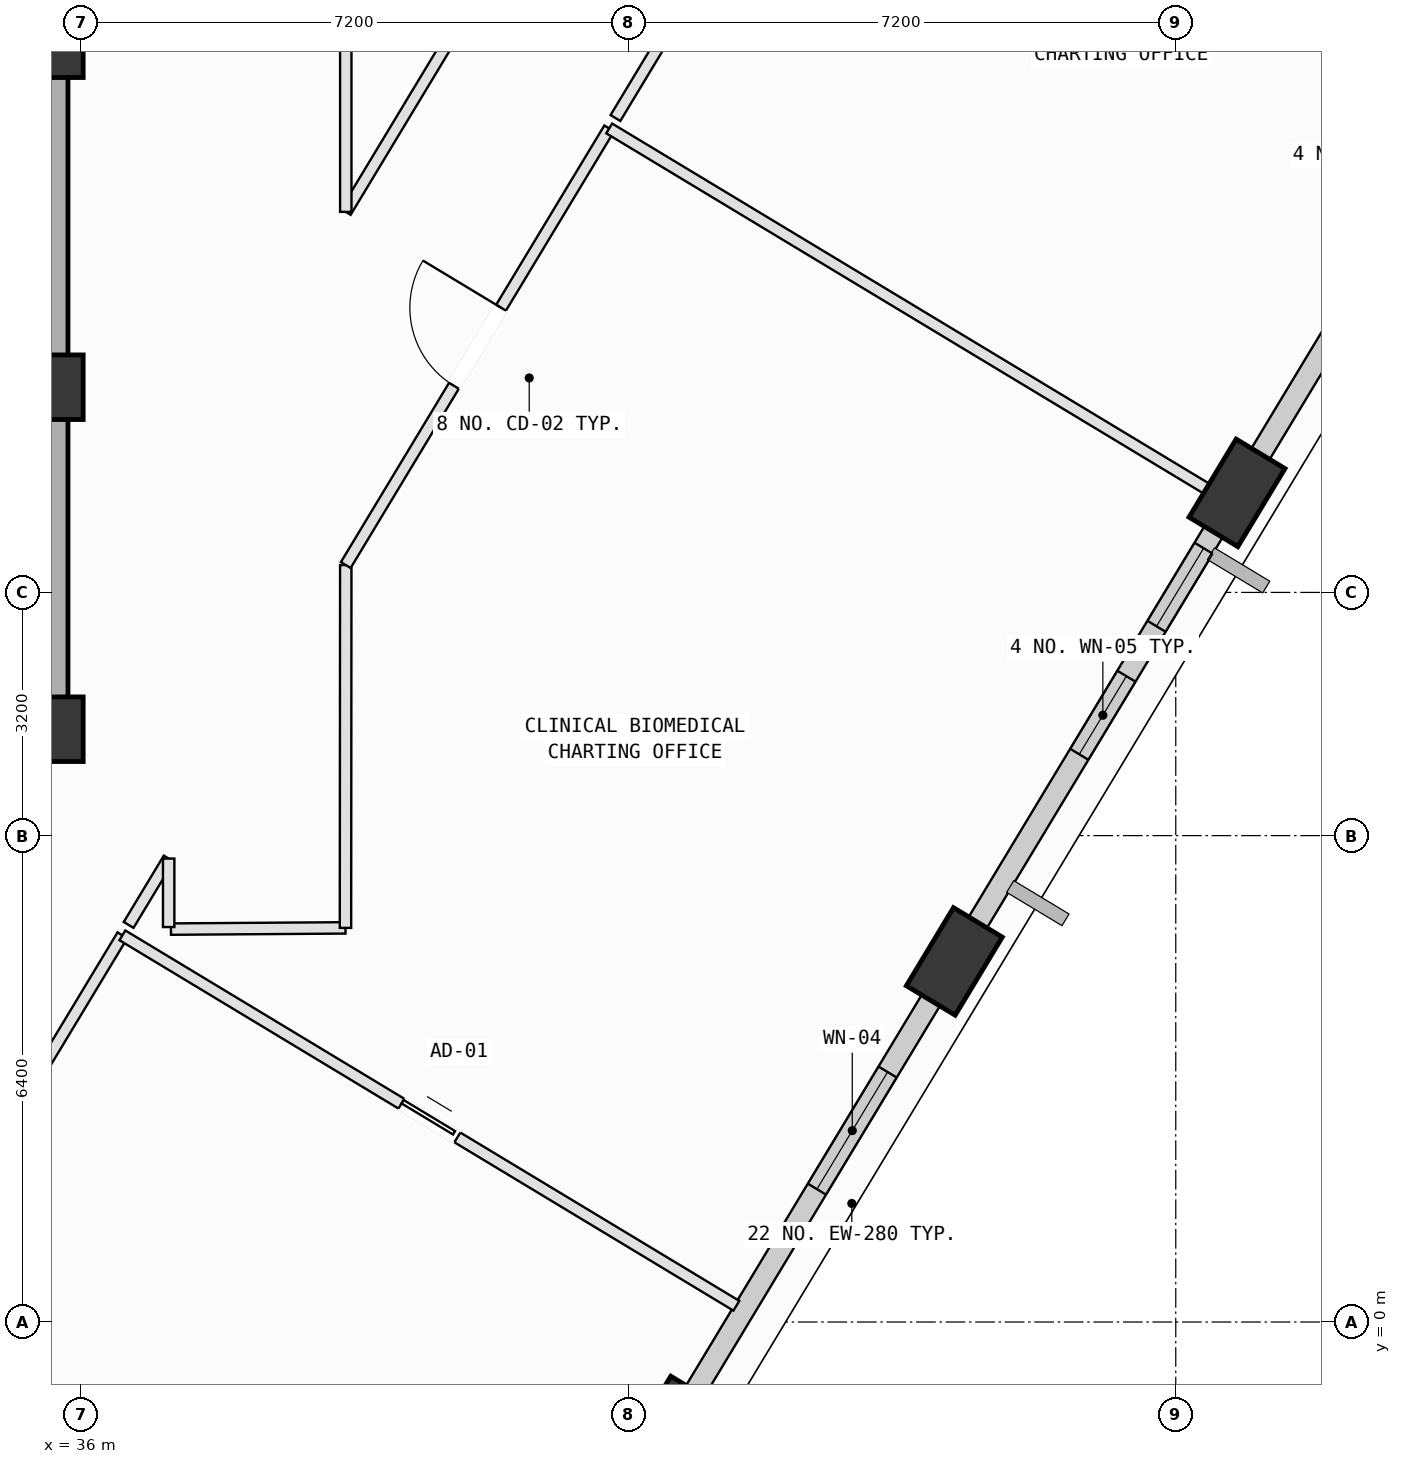
"""IFC4 building model, lengths in metres.
Left out: names, types, materials, properties, quantities, classifications, styles, units other than length and angle.
Written with IfcOpenShell. Run it as: python <this file> out.ifc"""

import sys

from ifc_helpers import new_model, si_unit, direction, frame, frame_2d, origin, origin_2d, place, context, subcontext, project, spatial, rectangle, extrude, element, fill, save


model = new_model("IFC4")
c1 = context("Model", 3, precision=1e-05, world=origin(), true_north=direction((0.0, 1.0)))
c2 = subcontext(c1, "Body", "Model", "MODEL_VIEW")
j1 = project(units=[si_unit("LENGTHUNIT", "METRE"), si_unit("PLANEANGLEUNIT", "RADIAN")], contexts=[c1])
p1 = place(None, origin())
s1 = spatial("IfcSite", under=j1, at=p1, CompositionType="ELEMENT")
p2 = place(p1, origin())
s2 = spatial("IfcBuilding", under=s1, at=p2, CompositionType="ELEMENT")
p3 = place(p2, frame((0.0, 0.0, 276.6)))
s3 = spatial("IfcBuildingStorey", under=s2, at=p3, CompositionType="ELEMENT", Elevation=276.6)
for number, where, z_axis, x_axis in (
    (1, (35.6, 7.8, 0.0), (0.0, 0.0, 1.0), (1.0, 0.0, 0.0)),
    (2, (35.6, 12.3, 0.0), (0.0, 0.0, 1.0), (1.0, 0.0, 0.0)),
    (3, (35.6, 16.8, 0.0), (0.0, 0.0, 1.0), (1.0, 0.0, 0.0)),
):
    element("IfcColumn", number, at=place(p3, frame(where, z_axis=z_axis, x_axis=x_axis)), inside=s3, PredefinedType="COLUMN", context=c2, shape_type="SweptSolid", body=[
        extrude(rectangle(XDim=0.85, YDim=0.85, at=origin_2d()), origin(), (0.0, 0.0, 1.0), 4.0),
    ])
p4 = place(p3, frame((43.768, -1.421, 0.002), z_axis=(0.107586077472, 0.042779573952, 0.993274958904), x_axis=(-0.981176466605, 0.165723838035, 0.099138039555)))
e4 = element("IfcColumn", 4, at=p4, inside=s3, PredefinedType="COLUMN", context=c2, shape_type="SweptSolid", body=[
    extrude(rectangle(XDim=1.2, YDim=0.75, at=origin_2d()), origin(), (0.0, 0.0, 1.0), 4.023),
])
p5 = place(p3, frame((47.487, 4.745, 0.002), z_axis=(0.082237012111, 0.057924517769, 0.9949280497), x_axis=(-0.993940655295, -0.068289052972, 0.086131173199)))
e5 = element("IfcColumn", 5, at=p5, inside=s3, PredefinedType="COLUMN", context=c2, shape_type="SweptSolid", body=[
    extrude(rectangle(XDim=1.2, YDim=0.75, at=origin_2d()), origin(), (0.0, 0.0, 1.0), 4.017),
])
p6 = place(p3, frame((51.206, 10.91, 0.002), z_axis=(0.056692424578, 0.073177024428, 0.995706328237), x_axis=(-0.930488175419, -0.357643802358, 0.079263270434)))
e6 = element("IfcColumn", 6, at=p6, inside=s3, PredefinedType="COLUMN", context=c2, shape_type="SweptSolid", body=[
    extrude(rectangle(XDim=1.2, YDim=0.75, at=origin_2d()), origin(), (0.0, 0.0, 1.0), 4.014),
])
p7 = place(p3, frame((47.381, 4.57, 0.0), z_axis=(0.0, 0.0, 1.0), x_axis=(-0.516524062201, -0.856272674542, 0.0)))
e7 = element("IfcWall", 7, at=p7, inside=s3, PredefinedType="SOLIDWALL", context=c2, shape_type="SweptSolid", body=[
    extrude(rectangle(XDim=6.438, YDim=0.28, at=frame_2d((3.219, 0.0))), origin(), (0.0, 0.0, 1.0), 3.265),
])
p8 = place(p7, frame((1.495, 0.0, 0.75)))
e8 = element("IfcOpeningElement", 8, at=p8, cuts=e7, PredefinedType="OPENING", context=c2, shape_type="SweptSolid", body=[
    extrude(rectangle(XDim=1.8, YDim=2.05, at=frame_2d((0.9, 1.025))), frame((0.0, 0.15, 0.0), z_axis=(0.0, -1.0, 0.0), x_axis=(1.0, 0.0, 0.0)), (0.0, 0.0, 1.0), 0.3),
])
p9 = place(p3, frame((51.096, 10.728, 0.0), z_axis=(0.0, 0.0, 1.0), x_axis=(-0.516526398174, -0.856271265423, 0.0)))
e9 = element("IfcWall", 9, at=p9, inside=s3, PredefinedType="SOLIDWALL", context=c2, shape_type="SweptSolid", body=[
    extrude(rectangle(XDim=6.414, YDim=0.28, at=frame_2d((3.207, 0.0))), origin(), (0.0, 0.0, 1.0), 3.265),
])
p10 = place(p9, frame((2.604, 0.0, 0.75)))
e10 = element("IfcOpeningElement", 10, at=p10, cuts=e9, PredefinedType="OPENING", context=c2, shape_type="SweptSolid", body=[
    extrude(rectangle(XDim=1.2, YDim=1.75, at=frame_2d((0.6, 0.875))), frame((0.0, 0.15, 0.0), z_axis=(0.0, -1.0, 0.0), x_axis=(1.0, 0.0, 0.0)), (0.0, 0.0, 1.0), 0.3),
])
p11 = place(p9, frame((0.637, 0.0, 0.75)))
e11 = element("IfcOpeningElement", 11, at=p11, cuts=e9, PredefinedType="OPENING", context=c2, shape_type="SweptSolid", body=[
    extrude(rectangle(XDim=1.2, YDim=1.75, at=frame_2d((0.6, 0.875))), frame((0.0, 0.15, 0.0), z_axis=(0.0, -1.0, 0.0), x_axis=(1.0, 0.0, 0.0)), (0.0, 0.0, 1.0), 0.3),
])
p12 = place(p3, frame((54.815, 16.894, 0.0), z_axis=(0.0, 0.0, 1.0), x_axis=(-0.516539738379, -0.856263218102, 0.0)))
e12 = element("IfcWall", 12, at=p12, inside=s3, PredefinedType="SOLIDWALL", context=c2, shape_type="SweptSolid", body=[
    extrude(rectangle(XDim=6.407, YDim=0.28, at=frame_2d((3.203, 0.0))), origin(), (0.0, 0.0, 1.0), 3.265),
])
p13 = place(p12, frame((2.404, 0.0, 0.75)))
e13 = element("IfcOpeningElement", 13, at=p13, cuts=e12, PredefinedType="OPENING", context=c2, shape_type="SweptSolid", body=[
    extrude(rectangle(XDim=1.6, YDim=1.95, at=frame_2d((0.8, 0.975))), frame((0.0, 0.15, 0.0), z_axis=(0.0, -1.0, 0.0), x_axis=(1.0, 0.0, 0.0)), (0.0, 0.0, 1.0), 0.3),
])
p14 = place(p3, frame((35.6, 7.8, 0.0), z_axis=(0.0, 0.0, 1.0), x_axis=(0.0, 1.0, 0.0)))
e14 = element("IfcWall", 14, at=p14, inside=s3, PredefinedType="SHEAR", context=c2, shape_type="SweptSolid", body=[
    extrude(rectangle(XDim=9.0, YDim=0.45, at=frame_2d((4.5, 0.0))), origin(), (0.0, 0.0, 1.0), 3.78),
])
p15 = place(p3, frame((30.355, -5.166, 0.0), z_axis=(0.0, 0.0, 1.0), x_axis=(0.516562927605, 0.856249228802, 0.0)))
e15 = element("IfcWall", 15, at=p15, inside=s3, PredefinedType="PARTITIONING", context=c2, shape_type="SweptSolid", body=[
    extrude(rectangle(XDim=11.975, YDim=0.15, at=frame_2d((5.988, 0.0))), origin(), (0.0, 0.0, 1.0), 3.78),
])
p16 = place(p3, frame((36.541, 5.088, 0.0), z_axis=(0.0, 0.0, 1.0), x_axis=(0.856225356417, -0.516602496151, 0.0)))
e16 = element("IfcWall", 16, at=p16, inside=s3, PredefinedType="PARTITIONING", context=c2, shape_type="SweptSolid", body=[
    extrude(rectangle(XDim=9.434, YDim=0.15, at=frame_2d((4.717, 0.0))), origin(), (0.0, 0.0, 1.0), 3.78),
])
p17 = place(p16, frame((4.287, 0.0, 0.0)))
e17 = element("IfcOpeningElement", 17, at=p17, cuts=e16, PredefinedType="OPENING", context=c2, shape_type="SweptSolid", body=[
    extrude(rectangle(XDim=0.86, YDim=2.06, at=frame_2d((0.43, 1.03))), frame((0.0, 0.085, 0.0), z_axis=(0.0, -1.0, 0.0), x_axis=(1.0, 0.0, 0.0)), (0.0, 0.0, 1.0), 0.17),
])
p18 = place(p3, frame((37.18, 5.17, 0.0), z_axis=(0.0, 0.0, 1.0), x_axis=(0.999975377948, 0.007017371073, 0.0)))
e18 = element("IfcWall", 18, at=p18, inside=s3, PredefinedType="PARTITIONING", context=c2, shape_type="SweptSolid", body=[
    extrude(rectangle(XDim=2.296, YDim=0.15, at=frame_2d((1.148, 0.0))), origin(), (0.0, 0.0, 1.0), 3.78),
])
p19 = place(p3, frame((39.476, 5.186, 0.0), z_axis=(0.0, 0.0, 1.0), x_axis=(0.000818246632, 0.999999665236, 0.0)))
e19 = element("IfcWall", 19, at=p19, inside=s3, PredefinedType="PARTITIONING", context=c2, shape_type="SweptSolid", body=[
    extrude(rectangle(XDim=4.774, YDim=0.15, at=frame_2d((2.387, 0.0))), origin(), (0.0, 0.0, 1.0), 3.78),
])
p20 = place(p3, frame((39.48, 9.96, 0.0), z_axis=(0.0, 0.0, 1.0), x_axis=(0.516575747775, 0.856241494446, 0.0)))
e20 = element("IfcWall", 20, at=p20, inside=s3, PredefinedType="PARTITIONING", context=c2, shape_type="SweptSolid", body=[
    extrude(rectangle(XDim=6.71, YDim=0.15, at=frame_2d((3.355, 0.0))), origin(), (0.0, 0.0, 1.0), 3.78),
])
p21 = place(p20, frame((2.755, 0.0, 0.0)))
e21 = element("IfcOpeningElement", 21, at=p21, cuts=e20, PredefinedType="OPENING", context=c2, shape_type="SweptSolid", body=[
    extrude(rectangle(XDim=1.2, YDim=2.15, at=frame_2d((0.6, 1.075))), frame((0.0, 0.085, 0.0), z_axis=(0.0, -1.0, 0.0), x_axis=(1.0, 0.0, 0.0)), (0.0, 0.0, 1.0), 0.17),
])
p22 = place(p3, frame((42.946, 15.705, 0.0), z_axis=(0.0, 0.0, 1.0), x_axis=(0.85631180797, -0.516459182831, 0.0)))
e22 = element("IfcWall", 22, at=p22, inside=s3, PredefinedType="PARTITIONING", context=c2, shape_type="SweptSolid", body=[
    extrude(rectangle(XDim=9.447, YDim=0.15, at=frame_2d((4.724, 0.0))), origin(), (0.0, 0.0, 1.0), 3.78),
])
p23 = place(p3, frame((47.98, 5.117, 0.0), z_axis=(0.0, 0.0, 1.0), x_axis=(-0.516847403062, -0.856077544355, 0.0)))
e23 = element("IfcWall", 23, at=p23, inside=s3, PredefinedType="PARTITIONING", context=c2, shape_type="SweptSolid", body=[
    extrude(rectangle(XDim=0.778, YDim=0.15, at=frame_2d((0.389, 0.0))), origin(), (0.0, 0.0, 1.0), 3.265),
])
p24 = place(p3, frame((36.623, 5.225, 0.0), z_axis=(0.0, 0.0, 1.0), x_axis=(0.516783003551, 0.856116421546, 0.0)))
e24 = element("IfcWall", 24, at=p24, inside=s3, PredefinedType="PARTITIONING", context=c2, shape_type="SweptSolid", body=[
    extrude(rectangle(XDim=1.02, YDim=0.15, at=frame_2d((0.51, 0.0))), origin(), (0.0, 0.0, 1.0), 3.78),
])
p25 = place(p3, frame((37.15, 6.098, 0.0), z_axis=(0.0, 0.0, 1.0), x_axis=(0.0, -1.0, 0.0)))
e25 = element("IfcWall", 25, at=p25, inside=s3, PredefinedType="PARTITIONING", context=c2, shape_type="SweptSolid", body=[
    extrude(rectangle(XDim=0.901, YDim=0.15, at=frame_2d((0.45, 0.0))), origin(), (0.0, 0.0, 1.0), 3.78),
])
p26 = place(p3, frame((43.028, 15.842, 0.0), z_axis=(0.0, 0.0, 1.0), x_axis=(0.516562112888, 0.856249720309, 0.0)))
e26 = element("IfcWall", 26, at=p26, inside=s3, PredefinedType="PARTITIONING", context=c2, shape_type="SweptSolid", body=[
    extrude(rectangle(XDim=12.24, YDim=0.15, at=frame_2d((6.12, 0.0))), origin(), (0.0, 0.0, 1.0), 3.415),
])
p27 = place(p26, frame((5.52, 0.0, 0.0)))
e27 = element("IfcOpeningElement", 27, at=p27, cuts=e26, PredefinedType="OPENING", context=c2, shape_type="SweptSolid", body=[
    extrude(rectangle(XDim=1.2, YDim=2.15, at=frame_2d((0.6, 1.075))), frame((0.0, 0.085, 0.0), z_axis=(0.0, -1.0, 0.0), x_axis=(1.0, 0.0, 0.0)), (0.0, 0.0, 1.0), 0.17),
])
p28 = place(p3, frame((51.703, 11.289, 0.0), z_axis=(0.0, 0.0, 1.0), x_axis=(-0.515730444954, -0.856750902041, 0.0)))
e28 = element("IfcWall", 28, at=p28, inside=s3, PredefinedType="PARTITIONING", context=c2, shape_type="SweptSolid", body=[
    extrude(rectangle(XDim=0.581, YDim=0.15, at=frame_2d((0.291, 0.0))), origin(), (0.0, 0.0, 1.0), 3.265),
])
p29 = place(p3, frame((42.599, 19.777, 0.0), z_axis=(0.0, 0.0, 1.0), x_axis=(-0.516569402647, -0.856245322468, 0.0)))
e29 = element("IfcWall", 29, at=p29, inside=s3, PredefinedType="PARTITIONING", context=c2, shape_type="SweptSolid", body=[
    extrude(rectangle(XDim=6.038, YDim=0.15, at=frame_2d((3.019, 0.0))), origin(), (0.0, 0.0, 1.0), 3.78),
])
p30 = place(p3, frame((39.48, 14.607, 0.0), z_axis=(0.0, 0.0, 1.0), x_axis=(0.0, 1.0, 0.0)))
e30 = element("IfcWall", 30, at=p30, inside=s3, PredefinedType="PARTITIONING", context=c2, shape_type="SweptSolid", body=[
    extrude(rectangle(XDim=6.246, YDim=0.15, at=frame_2d((3.123, 0.0))), origin(), (0.0, 0.0, 1.0), 3.78),
])
p31 = place(p8, origin())
e31 = element("IfcWindow", 31, at=p31, inside=s3, PartitioningType="SINGLE_PANEL", PredefinedType="WINDOW", context=c2, shape_type="SweptSolid", body=[
    extrude(rectangle(XDim=1.8, YDim=2.05, at=frame_2d((0.9, 1.025))), frame((0.0, 0.03, 0.0), z_axis=(0.0, -1.0, 0.0), x_axis=(1.0, 0.0, 0.0)), (0.0, 0.0, 1.0), 0.06),
])
fill(e8, e31)
p32 = place(p10, origin())
e32 = element("IfcWindow", 32, at=p32, inside=s3, PartitioningType="SINGLE_PANEL", PredefinedType="WINDOW", context=c2, shape_type="SweptSolid", body=[
    extrude(rectangle(XDim=1.2, YDim=1.75, at=frame_2d((0.6, 0.875))), frame((0.0, 0.03, 0.0), z_axis=(0.0, -1.0, 0.0), x_axis=(1.0, 0.0, 0.0)), (0.0, 0.0, 1.0), 0.06),
])
fill(e10, e32)
p33 = place(p11, origin())
e33 = element("IfcWindow", 33, at=p33, inside=s3, PartitioningType="SINGLE_PANEL", PredefinedType="WINDOW", context=c2, shape_type="SweptSolid", body=[
    extrude(rectangle(XDim=1.2, YDim=1.75, at=frame_2d((0.6, 0.875))), frame((0.0, 0.03, 0.0), z_axis=(0.0, -1.0, 0.0), x_axis=(1.0, 0.0, 0.0)), (0.0, 0.0, 1.0), 0.06),
])
fill(e11, e33)
p34 = place(p21, origin())
e34 = element("IfcDoor", 34, at=p34, inside=s3, OperationType="SINGLE_SWING_RIGHT", PredefinedType="DOOR", context=c2, shape_type="SweptSolid", body=[
    extrude(rectangle(XDim=1.2, YDim=2.15, at=frame_2d((0.6, 1.075))), frame((0.0, 0.025, 0.0), z_axis=(0.0, -1.0, 0.0), x_axis=(1.0, 0.0, 0.0)), (0.0, 0.0, 1.0), 0.05),
])
fill(e21, e34)
p35 = place(p17, origin())
e35 = element("IfcDoor", 35, at=p35, inside=s3, OperationType="SLIDING_TO_LEFT", PredefinedType="DOOR", context=c2, shape_type="SweptSolid", body=[
    extrude(rectangle(XDim=0.86, YDim=2.06, at=frame_2d((0.43, 1.03))), frame((0.0, 0.025, 0.0), z_axis=(0.0, -1.0, 0.0), x_axis=(1.0, 0.0, 0.0)), (0.0, 0.0, 1.0), 0.05),
])
fill(e17, e35)
save(model, sys.argv[1])
